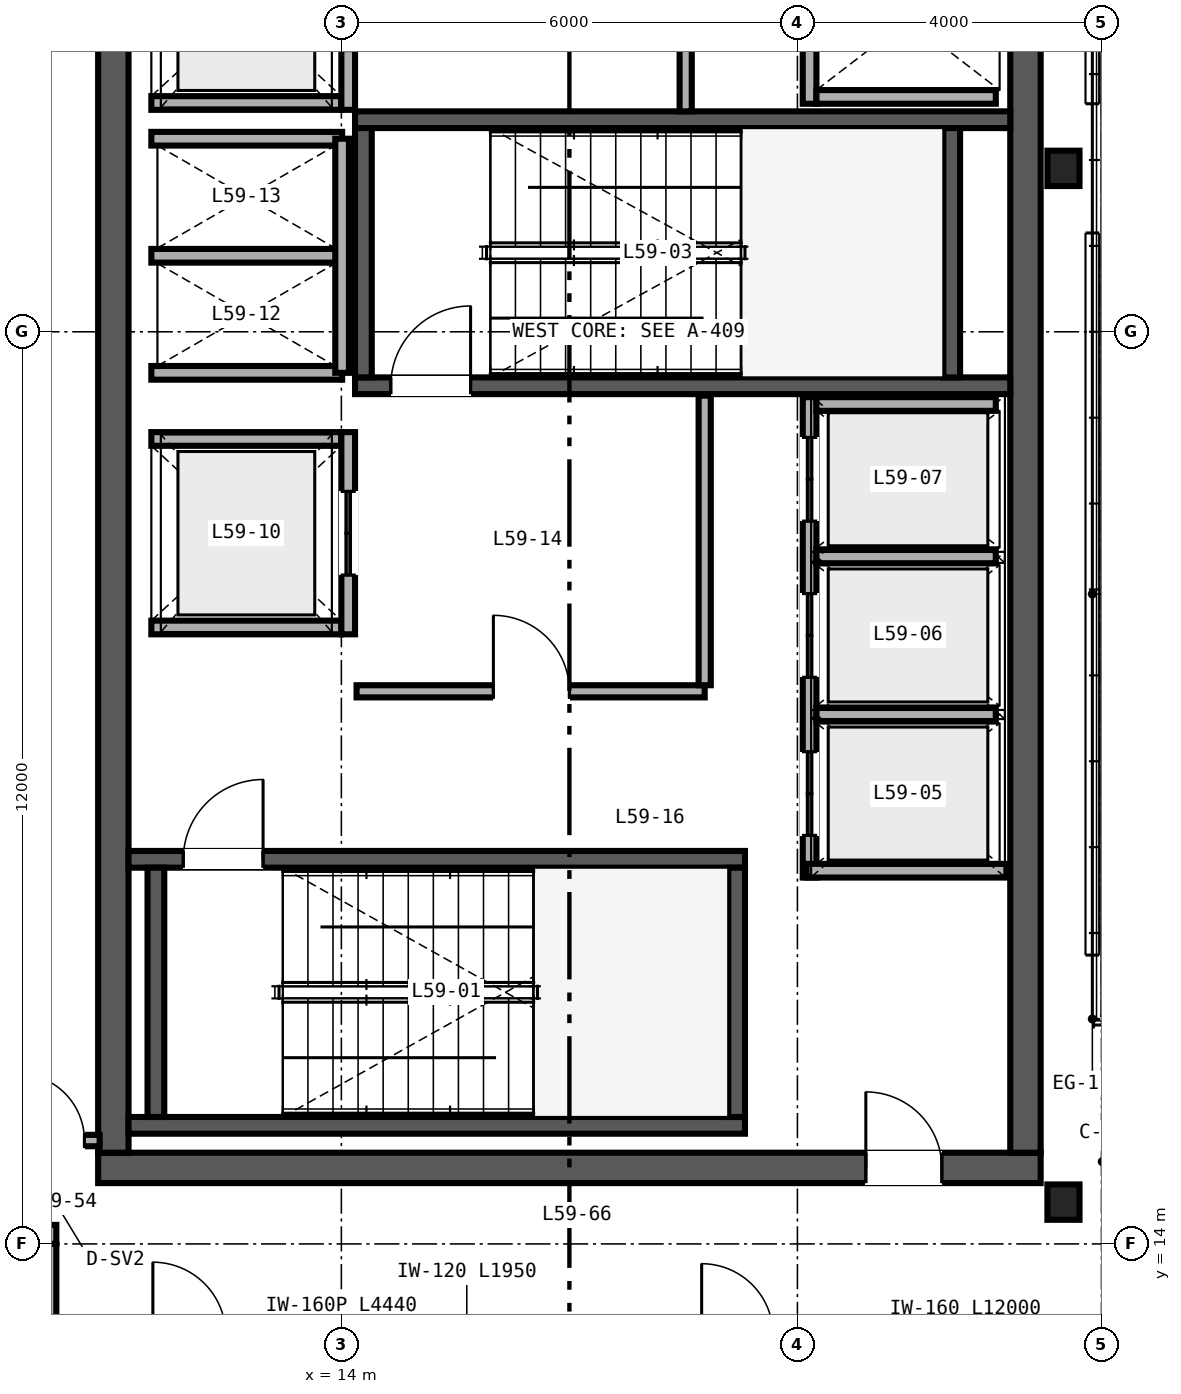
"""IFC4 building model, lengths in metres.
Left out: names, types, materials, properties, quantities, classifications, styles, units other than length and angle.
Written with IfcOpenShell. Run it as: python <this file> out.ifc"""

import sys

from ifc_helpers import new_model, si_unit, direction, frame, frame_2d, origin, origin_2d, place, context, subcontext, project, spatial, rectangle, i_section, extrude, source, transform, mapped, element, fill, save


model = new_model("IFC4")
c1 = context("Model", 3, precision=1e-05, world=origin(), true_north=direction((0.0, 1.0)))
c2 = subcontext(c1, "Body", "Model", "MODEL_VIEW")
j1 = project(units=[si_unit("LENGTHUNIT", "METRE"), si_unit("PLANEANGLEUNIT", "RADIAN")], contexts=[c1])
p1 = place(None, origin())
s1 = spatial("IfcSite", under=j1, at=p1, CompositionType="ELEMENT")
p2 = place(p1, origin())
s2 = spatial("IfcBuilding", under=s1, at=p2, CompositionType="ELEMENT")
p3 = place(p2, frame((0.0, 0.0, 236.4)))
s3 = spatial("IfcBuildingStorey", under=s2, at=p3, CompositionType="ELEMENT", Elevation=236.4)
p4 = place(p3, frame((10.8, 15.0, 0.0), z_axis=(0.0, 0.0, 1.0), x_axis=(1.0, 0.0, 0.0)))
e1 = element("IfcWall", 1, at=p4, inside=s3, PredefinedType="SHEAR", context=c2, shape_type="SweptSolid", body=[
    extrude(rectangle(XDim=12.4, YDim=0.4, at=frame_2d((6.2, 0.0))), origin(), (0.0, 0.0, 1.0), 3.38),
])
p5 = place(p4, frame((10.1, 0.0, 0.0)))
e2 = element("IfcOpeningElement", 2, at=p5, cuts=e1, PredefinedType="OPENING", context=c2, shape_type="SweptSolid", body=[
    extrude(rectangle(XDim=1.0, YDim=2.15, at=frame_2d((0.5, 1.075))), frame((0.0, 0.21, 0.0), z_axis=(0.0, -1.0, 0.0), x_axis=(1.0, 0.0, 0.0)), (0.0, 0.0, 1.0), 0.42),
])
for number, where, z_axis, x_axis in (
    (3, (11.0, 15.2, 0.0), (0.0, 0.0, 1.0), (0.0, 1.0, 0.0)),
    (4, (23.0, 15.2, 0.0), (0.0, 0.0, 1.0), (0.0, 1.0, 0.0)),
):
    element("IfcWall", number, at=place(p3, frame(where, z_axis=z_axis, x_axis=x_axis)), inside=s3, PredefinedType="SHEAR", context=c2, shape_type="SweptSolid", body=[
        extrude(rectangle(XDim=21.6, YDim=0.4, at=frame_2d((10.8, 0.0))), origin(), (0.0, 0.0, 1.0), 3.38),
    ])
p6 = place(p3, frame((11.2, 15.56, 0.0), z_axis=(0.0, 0.0, 1.0), x_axis=(1.0, 0.0, 0.0)))
e5 = element("IfcWall", 5, at=p6, inside=s3, PredefinedType="SHEAR", context=c2, shape_type="SweptSolid", body=[
    extrude(rectangle(XDim=8.11, YDim=0.22, at=frame_2d((4.055, 0.0))), origin(), (0.0, 0.0, 1.0), 3.4),
])
p7 = place(p3, frame((11.2, 19.06, 0.0), z_axis=(0.0, 0.0, 1.0), x_axis=(1.0, 0.0, 0.0)))
e6 = element("IfcWall", 6, at=p7, inside=s3, PredefinedType="SHEAR", context=c2, shape_type="SweptSolid", body=[
    extrude(rectangle(XDim=8.11, YDim=0.22, at=frame_2d((4.055, 0.0))), origin(), (0.0, 0.0, 1.0), 3.4),
])
p8 = place(p7, frame((0.72, 0.0, 0.0)))
e7 = element("IfcOpeningElement", 7, at=p8, cuts=e6, PredefinedType="OPENING", context=c2, shape_type="SweptSolid", body=[
    extrude(rectangle(XDim=1.05, YDim=2.15, at=frame_2d((0.525, 1.075))), frame((0.0, 0.12, 0.0), z_axis=(0.0, -1.0, 0.0), x_axis=(1.0, 0.0, 0.0)), (0.0, 0.0, 1.0), 0.24),
])
for number, where, z_axis, x_axis in (
    (8, (11.56, 15.67, 0.0), (0.0, 0.0, 1.0), (0.0, 1.0, 0.0)),
    (9, (19.2, 15.67, 0.0), (0.0, 0.0, 1.0), (0.0, 1.0, 0.0)),
):
    element("IfcWall", number, at=place(p3, frame(where, z_axis=z_axis, x_axis=x_axis)), inside=s3, PredefinedType="SHEAR", context=c2, shape_type="SweptSolid", body=[
        extrude(rectangle(XDim=3.28, YDim=0.22, at=frame_2d((1.64, 0.0))), origin(), (0.0, 0.0, 1.0), 3.4),
    ])
p9 = place(p3, frame((14.18, 25.29, 0.0), z_axis=(0.0, 0.0, 1.0), x_axis=(1.0, 0.0, 0.0)))
e10 = element("IfcWall", 10, at=p9, inside=s3, PredefinedType="SHEAR", context=c2, shape_type="SweptSolid", body=[
    extrude(rectangle(XDim=8.62, YDim=0.22, at=frame_2d((4.31, 0.0))), origin(), (0.0, 0.0, 1.0), 3.4),
])
p10 = place(p9, frame((0.47, 0.0, 0.0)))
e11 = element("IfcOpeningElement", 11, at=p10, cuts=e10, PredefinedType="OPENING", context=c2, shape_type="SweptSolid", body=[
    extrude(rectangle(XDim=1.05, YDim=2.15, at=frame_2d((0.525, 1.075))), frame((0.0, 0.12, 0.0), z_axis=(0.0, -1.0, 0.0), x_axis=(1.0, 0.0, 0.0)), (0.0, 0.0, 1.0), 0.24),
])
p11 = place(p3, frame((14.18, 28.79, 0.0), z_axis=(0.0, 0.0, 1.0), x_axis=(1.0, 0.0, 0.0)))
e12 = element("IfcWall", 12, at=p11, inside=s3, PredefinedType="SHEAR", context=c2, shape_type="SweptSolid", body=[
    extrude(rectangle(XDim=8.62, YDim=0.22, at=frame_2d((4.31, 0.0))), origin(), (0.0, 0.0, 1.0), 3.4),
])
for number, where, z_axis, x_axis in (
    (13, (14.29, 25.4, 0.0), (0.0, 0.0, 1.0), (0.0, 1.0, 0.0)),
    (14, (22.03, 25.4, 0.0), (0.0, 0.0, 1.0), (0.0, 1.0, 0.0)),
):
    element("IfcWall", number, at=place(p3, frame(where, z_axis=z_axis, x_axis=x_axis)), inside=s3, PredefinedType="SHEAR", context=c2, shape_type="SweptSolid", body=[
        extrude(rectangle(XDim=3.28, YDim=0.22, at=frame_2d((1.64, 0.0))), origin(), (0.0, 0.0, 1.0), 3.4),
    ])
m1 = source(origin(), c2, "Body", "SweptSolid", [
    extrude(i_section(OverallWidth=0.422, OverallDepth=0.465, WebThickness=0.045, FlangeThickness=0.073, FilletRadius=0.025, at=origin_2d()), origin(), (0.0, 0.0, 1.0), 3.38),
])
for number, where, z_axis, x_axis in (
    (15, (23.5, 14.55, 0.0), (0.0, 0.0, 1.0), (1.0, 0.0, 0.0)),
    (16, (23.5, 28.15, 0.0), (0.0, 0.0, 1.0), (1.0, 0.0, 0.0)),
):
    element("IfcColumn", number, at=place(p3, frame(where, z_axis=z_axis, x_axis=x_axis)), inside=s3, PredefinedType="COLUMN", context=c2, shape_type="MappedRepresentation", body=[
        mapped(m1, transform((0.0, 0.0, 0.0), scale=1.0)),
    ])
p12 = place(p3, frame((8.0, 14.125, 0.0), z_axis=(0.0, 0.0, 1.0), x_axis=(1.0, 0.0, 0.0)))
e17 = element("IfcWall", 17, at=p12, inside=s3, PredefinedType="SOLIDWALL", context=c2, shape_type="SweptSolid", body=[
    extrude(rectangle(XDim=2.25, YDim=0.25, at=frame_2d((1.125, 0.0))), origin(), (0.0, 0.0, 1.0), 3.38),
])
p13 = place(p3, frame((10.125, 14.0, 0.0), z_axis=(0.0, 0.0, 1.0), x_axis=(0.0, -1.0, 0.0)))
e18 = element("IfcWall", 18, at=p13, inside=s3, PredefinedType="SOLIDWALL", context=c2, shape_type="SweptSolid", body=[
    extrude(rectangle(XDim=2.0, YDim=0.25, at=frame_2d((1.0, 0.0))), origin(), (0.0, 0.0, 1.0), 3.38),
])
p14 = place(p3, frame((20.16, 18.82, 0.0), z_axis=(0.0, 0.0, 1.0), x_axis=(0.0, 1.0, 0.0)))
e19 = element("IfcWall", 19, at=p14, inside=s3, PredefinedType="SOLIDWALL", context=c2, shape_type="SweptSolid", body=[
    extrude(rectangle(XDim=6.32, YDim=0.18, at=frame_2d((3.16, 0.0))), origin(), (0.0, 0.0, 1.0), 2.48),
])
p15 = place(p14, frame((0.555, 0.0, 0.0)))
e20 = element("IfcOpeningElement", 20, at=p15, cuts=e19, PredefinedType="OPENING", context=c2, shape_type="SweptSolid", body=[
    extrude(rectangle(XDim=1.1, YDim=2.2, at=frame_2d((0.55, 1.1))), frame((0.0, 0.1, 0.0), z_axis=(0.0, -1.0, 0.0), x_axis=(1.0, 0.0, 0.0)), (0.0, 0.0, 1.0), 0.2),
])
p16 = place(p14, frame((2.635, 0.0, 0.0)))
e21 = element("IfcOpeningElement", 21, at=p16, cuts=e19, PredefinedType="OPENING", context=c2, shape_type="SweptSolid", body=[
    extrude(rectangle(XDim=1.1, YDim=2.2, at=frame_2d((0.55, 1.1))), frame((0.0, 0.1, 0.0), z_axis=(0.0, -1.0, 0.0), x_axis=(1.0, 0.0, 0.0)), (0.0, 0.0, 1.0), 0.2),
])
p17 = place(p14, frame((4.69, 0.0, 0.0)))
e22 = element("IfcOpeningElement", 22, at=p17, cuts=e19, PredefinedType="OPENING", context=c2, shape_type="SweptSolid", body=[
    extrude(rectangle(XDim=1.1, YDim=2.2, at=frame_2d((0.55, 1.1))), frame((0.0, 0.1, 0.0), z_axis=(0.0, -1.0, 0.0), x_axis=(1.0, 0.0, 0.0)), (0.0, 0.0, 1.0), 0.2),
])
p18 = place(p3, frame((20.12, 18.91, 0.0), z_axis=(0.0, 0.0, 1.0), x_axis=(1.0, 0.0, 0.0)))
e23 = element("IfcWall", 23, at=p18, inside=s3, PredefinedType="SOLIDWALL", context=c2, shape_type="SweptSolid", body=[
    extrude(rectangle(XDim=2.63, YDim=0.18, at=frame_2d((1.315, 0.0))), origin(), (0.0, 0.0, 1.0), 3.38),
])
p19 = place(p3, frame((20.25, 25.05, 0.0), z_axis=(0.0, 0.0, 1.0), x_axis=(1.0, 0.0, 0.0)))
e24 = element("IfcWall", 24, at=p19, inside=s3, PredefinedType="SOLIDWALL", context=c2, shape_type="SweptSolid", body=[
    extrude(rectangle(XDim=2.36, YDim=0.18, at=frame_2d((1.18, 0.0))), origin(), (0.0, 0.0, 1.0), 3.38),
])
p20 = place(p3, frame((20.25, 20.965, 0.0), z_axis=(0.0, 0.0, 1.0), x_axis=(1.0, 0.0, 0.0)))
e25 = element("IfcWall", 25, at=p20, inside=s3, PredefinedType="SOLIDWALL", context=c2, shape_type="SweptSolid", body=[
    extrude(rectangle(XDim=2.36, YDim=0.18, at=frame_2d((1.18, 0.0))), origin(), (0.0, 0.0, 1.0), 2.48),
])
p21 = place(p3, frame((20.25, 23.045, 0.0), z_axis=(0.0, 0.0, 1.0), x_axis=(1.0, 0.0, 0.0)))
e26 = element("IfcWall", 26, at=p21, inside=s3, PredefinedType="SOLIDWALL", context=c2, shape_type="SweptSolid", body=[
    extrude(rectangle(XDim=2.36, YDim=0.18, at=frame_2d((1.18, 0.0))), origin(), (0.0, 0.0, 1.0), 3.38),
])
p22 = place(p3, frame((20.16, 29.0, 0.0), z_axis=(0.0, 0.0, 1.0), x_axis=(0.0, 1.0, 0.0)))
e27 = element("IfcWall", 27, at=p22, inside=s3, PredefinedType="SOLIDWALL", context=c2, shape_type="SweptSolid", body=[
    extrude(rectangle(XDim=4.29, YDim=0.18, at=frame_2d((2.145, 0.0))), origin(), (0.0, 0.0, 1.0), 3.38),
])
p23 = place(p3, frame((20.25, 29.09, 0.0), z_axis=(0.0, 0.0, 1.0), x_axis=(1.0, 0.0, 0.0)))
e28 = element("IfcWall", 28, at=p23, inside=s3, PredefinedType="SOLIDWALL", context=c2, shape_type="SweptSolid", body=[
    extrude(rectangle(XDim=2.36, YDim=0.18, at=frame_2d((1.18, 0.0))), origin(), (0.0, 0.0, 1.0), 3.38),
])
for number, where, z_axis, x_axis in (
    (29, (11.5, 22.11, 0.0), (0.0, 0.0, 1.0), (1.0, 0.0, 0.0)),
    (30, (11.5, 24.59, 0.0), (0.0, 0.0, 1.0), (1.0, 0.0, 0.0)),
):
    element("IfcWall", number, at=place(p3, frame(where, z_axis=z_axis, x_axis=x_axis)), inside=s3, PredefinedType="SOLIDWALL", context=c2, shape_type="SweptSolid", body=[
        extrude(rectangle(XDim=2.5, YDim=0.18, at=frame_2d((1.25, 0.0))), origin(), (0.0, 0.0, 1.0), 3.38),
    ])
p24 = place(p3, frame((14.09, 22.02, 0.0), z_axis=(0.0, 0.0, 1.0), x_axis=(0.0, 1.0, 0.0)))
e31 = element("IfcWall", 31, at=p24, inside=s3, PredefinedType="SOLIDWALL", context=c2, shape_type="SweptSolid", body=[
    extrude(rectangle(XDim=2.66, YDim=0.18, at=frame_2d((1.33, 0.0))), origin(), (0.0, 0.0, 1.0), 3.38),
])
p25 = place(p24, frame((0.78, 0.0, 0.0)))
e32 = element("IfcOpeningElement", 32, at=p25, cuts=e31, PredefinedType="OPENING", context=c2, shape_type="SweptSolid", body=[
    extrude(rectangle(XDim=1.1, YDim=2.2, at=frame_2d((0.55, 1.1))), frame((0.0, 0.1, 0.0), z_axis=(0.0, -1.0, 0.0), x_axis=(1.0, 0.0, 0.0)), (0.0, 0.0, 1.0), 0.2),
])
p26 = place(p3, frame((11.5, 29.01, 0.0), z_axis=(0.0, 0.0, 1.0), x_axis=(1.0, 0.0, 0.0)))
e33 = element("IfcWall", 33, at=p26, inside=s3, PredefinedType="SOLIDWALL", context=c2, shape_type="SweptSolid", body=[
    extrude(rectangle(XDim=2.5, YDim=0.18, at=frame_2d((1.25, 0.0))), origin(), (0.0, 0.0, 1.0), 3.38),
])
p27 = place(p3, frame((14.09, 28.92, 0.0), z_axis=(0.0, 0.0, 1.0), x_axis=(0.0, 1.0, 0.0)))
e34 = element("IfcWall", 34, at=p27, inside=s3, PredefinedType="SOLIDWALL", context=c2, shape_type="SweptSolid", body=[
    extrude(rectangle(XDim=2.66, YDim=0.18, at=frame_2d((1.33, 0.0))), origin(), (0.0, 0.0, 1.0), 3.38),
])
p28 = place(p27, frame((0.78, 0.0, 0.0)))
e35 = element("IfcOpeningElement", 35, at=p28, cuts=e34, PredefinedType="OPENING", context=c2, shape_type="SweptSolid", body=[
    extrude(rectangle(XDim=1.1, YDim=2.2, at=frame_2d((0.55, 1.1))), frame((0.0, 0.1, 0.0), z_axis=(0.0, -1.0, 0.0), x_axis=(1.0, 0.0, 0.0)), (0.0, 0.0, 1.0), 0.2),
])
for number, where, z_axis, x_axis in (
    (36, (11.5, 25.46, 0.0), (0.0, 0.0, 1.0), (1.0, 0.0, 0.0)),
    (37, (11.5, 27.0, 0.0), (0.0, 0.0, 1.0), (1.0, 0.0, 0.0)),
    (38, (11.5, 28.54, 0.0), (0.0, 0.0, 1.0), (1.0, 0.0, 0.0)),
):
    element("IfcWall", number, at=place(p3, frame(where, z_axis=z_axis, x_axis=x_axis)), inside=s3, PredefinedType="SOLIDWALL", context=c2, shape_type="SweptSolid", body=[
        extrude(rectangle(XDim=2.51, YDim=0.18, at=frame_2d((1.255, 0.0))), origin(), (0.0, 0.0, 1.0), 3.38),
    ])
p29 = place(p3, frame((14.01, 25.46, 0.0), z_axis=(0.0, 0.0, 1.0), x_axis=(0.0, 1.0, 0.0)))
e39 = element("IfcWall", 39, at=p29, inside=s3, PredefinedType="SOLIDWALL", context=c2, shape_type="SweptSolid", body=[
    extrude(rectangle(XDim=3.08, YDim=0.18, at=frame_2d((1.54, 0.0))), origin(), (0.0, 0.0, 1.0), 3.38),
])
p30 = place(p3, frame((14.2, 21.27, 0.0), z_axis=(0.0, 0.0, 1.0), x_axis=(1.0, 0.0, 0.0)))
e40 = element("IfcWall", 40, at=p30, inside=s3, PredefinedType="PARTITIONING", context=c2, shape_type="SweptSolid", body=[
    extrude(rectangle(XDim=4.58, YDim=0.16, at=frame_2d((2.29, 0.0))), origin(), (0.0, 0.0, 1.0), 3.38),
])
p31 = place(p30, frame((1.8, 0.0, 0.0)))
e41 = element("IfcOpeningElement", 41, at=p31, cuts=e40, PredefinedType="OPENING", context=c2, shape_type="SweptSolid", body=[
    extrude(rectangle(XDim=1.0, YDim=2.15, at=frame_2d((0.5, 1.075))), frame((0.0, 0.09, 0.0), z_axis=(0.0, -1.0, 0.0), x_axis=(1.0, 0.0, 0.0)), (0.0, 0.0, 1.0), 0.18),
])
p32 = place(p3, frame((18.78, 21.35, 0.0), z_axis=(0.0, 0.0, 1.0), x_axis=(0.0, 1.0, 0.0)))
e42 = element("IfcWall", 42, at=p32, inside=s3, PredefinedType="PARTITIONING", context=c2, shape_type="SweptSolid", body=[
    extrude(rectangle(XDim=3.81, YDim=0.16, at=frame_2d((1.905, 0.0))), origin(), (0.0, 0.0, 1.0), 3.38),
])
p33 = place(p3, frame((18.53, 28.9, 0.0), z_axis=(0.0, 0.0, 1.0), x_axis=(0.0, 1.0, 0.0)))
e43 = element("IfcWall", 43, at=p33, inside=s3, PredefinedType="PARTITIONING", context=c2, shape_type="SweptSolid", body=[
    extrude(rectangle(XDim=3.9, YDim=0.16, at=frame_2d((1.95, 0.0))), origin(), (0.0, 0.0, 1.0), 3.38),
])
p34 = place(p33, frame((1.5, 0.0, 0.0)))
e44 = element("IfcOpeningElement", 44, at=p34, cuts=e43, PredefinedType="OPENING", context=c2, shape_type="SweptSolid", body=[
    extrude(rectangle(XDim=1.0, YDim=2.15, at=frame_2d((0.5, 1.075))), frame((0.0, 0.09, 0.0), z_axis=(0.0, -1.0, 0.0), x_axis=(1.0, 0.0, 0.0)), (0.0, 0.0, 1.0), 0.18),
])
p35 = place(p3, frame((8.16, 15.36, 0.0), z_axis=(0.0, 0.0, 1.0), x_axis=(1.0, 0.0, 0.0)))
e45 = element("IfcWall", 45, at=p35, inside=s3, PredefinedType="PARTITIONING", context=c2, shape_type="SweptSolid", body=[
    extrude(rectangle(XDim=2.66, YDim=0.15, at=frame_2d((1.33, 0.0))), origin(), (0.0, 0.0, 1.0), 2.601),
])
p36 = place(p35, frame((1.58, 0.0, 0.0)))
e46 = element("IfcOpeningElement", 46, at=p36, cuts=e45, PredefinedType="OPENING", context=c2, shape_type="SweptSolid", body=[
    extrude(rectangle(XDim=0.88, YDim=2.15, at=frame_2d((0.44, 1.075))), frame((0.0, 0.085, 0.0), z_axis=(0.0, -1.0, 0.0), x_axis=(1.0, 0.0, 0.0)), (0.0, 0.0, 1.0), 0.17),
])
m2 = source(origin(), c2, "Body", "SweptSolid", [
    extrude(rectangle(XDim=1.05, YDim=2.15, at=frame_2d((0.525, 1.075))), frame((0.0, 0.025, 0.0), z_axis=(0.0, -1.0, 0.0), x_axis=(1.0, 0.0, 0.0)), (0.0, 0.0, 1.0), 0.05),
])
p37 = place(p8, origin())
e47 = element("IfcDoor", 47, at=p37, inside=s3, OperationType="SINGLE_SWING_RIGHT", PredefinedType="DOOR", context=c2, shape_type="MappedRepresentation", body=[
    mapped(m2, transform((0.0, 0.0, 0.0), scale=1.0)),
])
fill(e7, e47)
p38 = place(p10, origin())
e48 = element("IfcDoor", 48, at=p38, inside=s3, OperationType="SINGLE_SWING_RIGHT", PredefinedType="DOOR", context=c2, shape_type="MappedRepresentation", body=[
    mapped(m2, transform((0.0, 0.0, 0.0), scale=1.0)),
])
fill(e11, e48)
m3 = source(origin(), c2, "Body", "SweptSolid", [
    extrude(rectangle(XDim=1.1, YDim=2.2, at=frame_2d((0.55, 1.1))), frame((0.0, 0.025, 0.0), z_axis=(0.0, -1.0, 0.0), x_axis=(1.0, 0.0, 0.0)), (0.0, 0.0, 1.0), 0.05),
])
p39 = place(p15, origin())
e49 = element("IfcDoor", 49, at=p39, inside=s3, OperationType="DOUBLE_DOOR_SLIDING", PredefinedType="DOOR", context=c2, shape_type="MappedRepresentation", body=[
    mapped(m3, transform((0.0, 0.0, 0.0), scale=1.0)),
])
fill(e20, e49)
p40 = place(p16, origin())
e50 = element("IfcDoor", 50, at=p40, inside=s3, OperationType="DOUBLE_DOOR_SLIDING", PredefinedType="DOOR", context=c2, shape_type="MappedRepresentation", body=[
    mapped(m3, transform((0.0, 0.0, 0.0), scale=1.0)),
])
fill(e21, e50)
p41 = place(p17, origin())
e51 = element("IfcDoor", 51, at=p41, inside=s3, OperationType="DOUBLE_DOOR_SLIDING", PredefinedType="DOOR", context=c2, shape_type="MappedRepresentation", body=[
    mapped(m3, transform((0.0, 0.0, 0.0), scale=1.0)),
])
fill(e22, e51)
p42 = place(p25, origin())
e52 = element("IfcDoor", 52, at=p42, inside=s3, OperationType="DOUBLE_DOOR_SLIDING", PredefinedType="DOOR", context=c2, shape_type="MappedRepresentation", body=[
    mapped(m3, transform((0.0, 0.0, 0.0), scale=1.0)),
])
fill(e32, e52)
m4 = source(origin(), c2, "Body", "SweptSolid", [
    extrude(rectangle(XDim=1.0, YDim=2.15, at=frame_2d((0.5, 1.075))), frame((0.0, 0.025, 0.0), z_axis=(0.0, -1.0, 0.0), x_axis=(1.0, 0.0, 0.0)), (0.0, 0.0, 1.0), 0.05),
])
p43 = place(p31, origin())
e53 = element("IfcDoor", 53, at=p43, inside=s3, OperationType="SINGLE_SWING_LEFT", PredefinedType="DOOR", context=c2, shape_type="MappedRepresentation", body=[
    mapped(m4, transform((0.0, 0.0, 0.0), scale=1.0)),
])
fill(e41, e53)
p44 = place(p5, origin())
e54 = element("IfcDoor", 54, at=p44, inside=s3, OperationType="SINGLE_SWING_LEFT", PredefinedType="DOOR", context=c2, shape_type="MappedRepresentation", body=[
    mapped(m4, transform((0.0, 0.0, 0.0), scale=1.0)),
])
fill(e2, e54)
m5 = source(origin(), c2, "Body", "SweptSolid", [
    extrude(rectangle(XDim=0.88, YDim=2.15, at=frame_2d((0.44, 1.075))), frame((0.0, 0.025, 0.0), z_axis=(0.0, -1.0, 0.0), x_axis=(1.0, 0.0, 0.0)), (0.0, 0.0, 1.0), 0.05),
])
p45 = place(p36, origin())
e55 = element("IfcDoor", 55, at=p45, inside=s3, OperationType="SINGLE_SWING_LEFT", PredefinedType="DOOR", context=c2, shape_type="MappedRepresentation", body=[
    mapped(m5, transform((0.0, 0.0, 0.0), scale=1.0)),
])
fill(e46, e55)
save(model, sys.argv[1])
